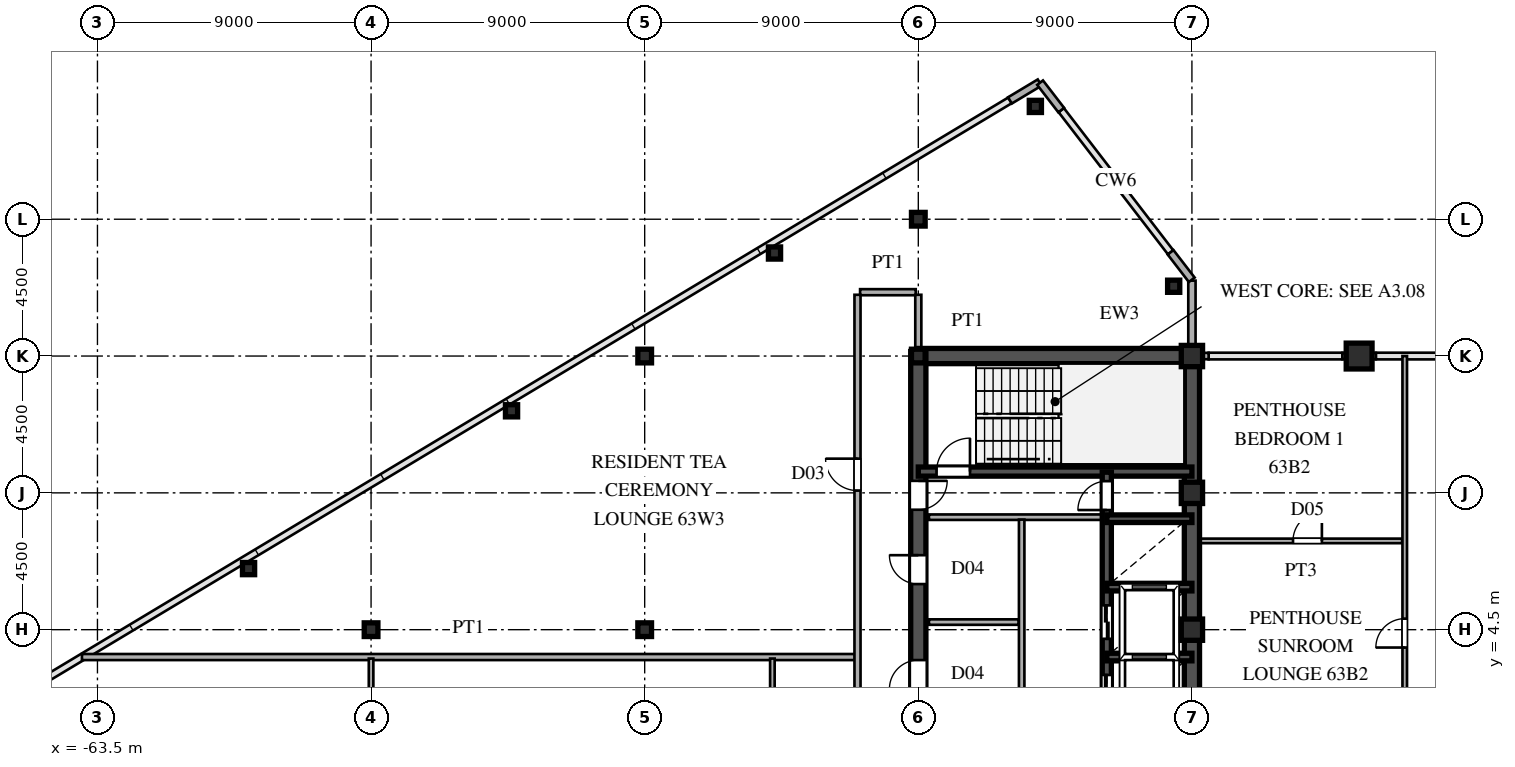
"""IFC4 building model, lengths in metres.
Left out: names, types, materials, properties, quantities, classifications, styles, units other than length and angle.
Written with IfcOpenShell. Run it as: python <this file> out.ifc"""

import sys

from ifc_helpers import new_model, si_unit, direction, frame, frame_2d, origin, origin_2d, place, context, subcontext, project, spatial, rectangle, hollow_rectangle, i_section, extrude, source, transform, mapped, element, fill, save


model = new_model("IFC4")
c1 = context("Model", 3, precision=1e-05, world=origin(), true_north=direction((0.0, 1.0)))
c2 = subcontext(c1, "Body", "Model", "MODEL_VIEW")
j1 = project(units=[si_unit("LENGTHUNIT", "METRE"), si_unit("PLANEANGLEUNIT", "RADIAN")], contexts=[c1])
p1 = place(None, origin())
s1 = spatial("IfcSite", under=j1, at=p1, CompositionType="ELEMENT")
p2 = place(p1, origin())
s2 = spatial("IfcBuilding", under=s1, at=p2, CompositionType="ELEMENT")
p3 = place(p2, frame((0.0, 0.0, 239.4)))
s3 = spatial("IfcBuildingStorey", under=s2, at=p3, CompositionType="ELEMENT", Elevation=239.4)
m1 = source(origin(), c2, "Body", "SweptSolid", [
    extrude(hollow_rectangle(XDim=0.7, YDim=0.7, WallThickness=0.03, at=origin_2d()), origin(), (0.0, 0.0, 1.0), 3.75),
])
for number, where, z_axis, x_axis in (
    (1, (-27.5, 4.5, 0.0), (0.0, 0.0, 1.0), (1.0, 0.0, 0.0)),
    (2, (-27.5, 9.0, 0.0), (0.0, 0.0, 1.0), (1.0, 0.0, 0.0)),
    (3, (-27.5, 13.5, 0.0), (0.0, 0.0, 1.0), (1.0, 0.0, 0.0)),
):
    element("IfcColumn", number, at=place(p3, frame(where, z_axis=z_axis, x_axis=x_axis)), inside=s3, PredefinedType="COLUMN", context=c2, shape_type="MappedRepresentation", body=[
        mapped(m1, transform((0.0, 0.0, 0.0), scale=1.0)),
    ])
m2 = source(origin(), c2, "Body", "SweptSolid", [
    extrude(i_section(OverallWidth=0.45, OverallDepth=0.45, WebThickness=0.016, FlangeThickness=0.025, at=origin_2d()), origin(), (0.0, 0.0, 1.0), 3.75),
])
for number, where, z_axis, x_axis in (
    (4, (-36.5, 13.5, 0.0), (0.0, 0.0, 1.0), (1.0, 0.0, 0.0)),
    (5, (-36.5, 18.0, 0.0), (0.0, 0.0, 1.0), (1.0, 0.0, 0.0)),
    (6, (-45.5, 4.5, 0.0), (0.0, 0.0, 1.0), (1.0, 0.0, 0.0)),
    (7, (-45.5, 13.5, 0.0), (0.0, 0.0, 1.0), (1.0, 0.0, 0.0)),
    (8, (-54.5, 4.5, 0.0), (0.0, 0.0, 1.0), (1.0, 0.0, 0.0)),
):
    element("IfcColumn", number, at=place(p3, frame(where, z_axis=z_axis, x_axis=x_axis)), inside=s3, PredefinedType="COLUMN", context=c2, shape_type="MappedRepresentation", body=[
        mapped(m2, transform((0.0, 0.0, 0.0), scale=1.0)),
    ])
m3 = source(origin(), c2, "Body", "SweptSolid", [
    extrude(hollow_rectangle(XDim=0.4, YDim=0.4, WallThickness=0.016, at=origin_2d()), origin(), (0.0, 0.0, 1.0), 3.75),
])
for number, where, z_axis, x_axis in (
    (9, (-28.1, 15.796, 0.0), (0.0, 0.0, 1.0), (1.0, 0.0, 0.0)),
    (10, (-32.65, 21.71, 0.0), (0.0, 0.0, 1.0), (1.0, 0.0, 0.0)),
    (11, (-41.23, 16.889, 0.0), (0.0, 0.0, 1.0), (1.0, 0.0, 0.0)),
    (12, (-49.88, 11.699, 0.0), (0.0, 0.0, 1.0), (1.0, 0.0, 0.0)),
    (13, (-58.53, 6.509, 0.0), (0.0, 0.0, 1.0), (1.0, 0.0, 0.0)),
):
    element("IfcColumn", number, at=place(p3, frame(where, z_axis=z_axis, x_axis=x_axis)), inside=s3, PredefinedType="COLUMN", context=c2, shape_type="MappedRepresentation", body=[
        mapped(m3, transform((0.0, 0.0, 0.0), scale=1.0)),
    ])
m4 = source(origin(), c2, "Body", "SweptSolid", [
    extrude(hollow_rectangle(XDim=0.85, YDim=0.85, WallThickness=0.036, at=origin_2d()), origin(), (0.0, 0.0, 1.0), 3.75),
])
p4 = place(p3, frame((-22.0, 13.5, 0.0), z_axis=(0.0, 0.0, 1.0), x_axis=(1.0, 0.0, 0.0)))
e14 = element("IfcColumn", 14, at=p4, inside=s3, PredefinedType="COLUMN", context=c2, shape_type="MappedRepresentation", body=[
    mapped(m4, transform((0.0, 0.0, 0.0), scale=1.0)),
])
p5 = place(p3, frame((-27.5, 13.755, 0.0), z_axis=(0.0, 0.0, 1.0), x_axis=(0.0, 1.0, 0.0)))
e15 = element("IfcWall", 15, at=p5, inside=s3, PredefinedType="SOLIDWALL", context=c2, shape_type="SweptSolid", body=[
    extrude(rectangle(XDim=0.62, YDim=0.24, at=frame_2d((0.31, 0.0))), origin(), (0.0, 0.0, 1.0), 3.03),
])
p6 = place(p3, frame((-27.5, 14.375, 0.0), z_axis=(0.0, 0.0, 1.0), x_axis=(0.0, 1.0, 0.0)))
e16 = element("IfcWall", 16, at=p6, inside=s3, PredefinedType="SOLIDWALL", context=c2, shape_type="SweptSolid", body=[
    extrude(rectangle(XDim=1.605, YDim=0.24, at=frame_2d((0.803, 0.0))), origin(), (0.0, 0.0, 1.0), 3.53),
])
for number, where, z_axis, x_axis in (
    (17, (-27.506, 16.008, 0.0), (0.0, 0.0, 1.0), (-0.61, 0.793, 0.0)),
    (18, (-31.799, 21.588, 0.0), (0.0, 0.0, 1.0), (-0.61, 0.793, 0.0)),
    (19, (-32.509, 22.495, 0.0), (0.0, 0.0, 1.0), (-0.857, -0.515, 0.0)),
):
    element("IfcWall", number, at=place(p3, frame(where, z_axis=z_axis, x_axis=x_axis)), inside=s3, PredefinedType="SOLIDWALL", context=c2, shape_type="SweptSolid", body=[
        extrude(rectangle(XDim=1.14, YDim=0.24, at=frame_2d((0.57, 0.0))), origin(), (0.0, 0.0, 1.0), 3.53),
    ])
p7 = place(p3, frame((-27.49, 13.5, 0.0), z_axis=(0.0, 0.0, 1.0), x_axis=(1.0, 0.0, 0.0)))
e20 = element("IfcWall", 20, at=p7, inside=s3, PredefinedType="SOLIDWALL", context=c2, shape_type="SweptSolid", body=[
    extrude(rectangle(XDim=0.54, YDim=0.21, at=frame_2d((0.27, 0.0))), origin(), (0.0, 0.0, 1.0), 3.03),
])
p8 = place(p3, frame((-22.55, 13.5, 0.0), z_axis=(0.0, 0.0, 1.0), x_axis=(1.0, 0.0, 0.0)))
e21 = element("IfcWall", 21, at=p8, inside=s3, PredefinedType="SOLIDWALL", context=c2, shape_type="SweptSolid", body=[
    extrude(rectangle(XDim=1.1, YDim=0.21, at=frame_2d((0.55, 0.0))), origin(), (0.0, 0.0, 1.0), 3.03),
])
p9 = place(p3, frame((-27.5, 1.3, 0.0), z_axis=(0.0, 0.0, 1.0), x_axis=(0.0, 1.0, 0.0)))
e22 = element("IfcWall", 22, at=p9, inside=s3, PredefinedType="SHEAR", context=c2, shape_type="SweptSolid", body=[
    extrude(rectangle(XDim=12.2, YDim=0.5, at=frame_2d((6.1, 0.0))), origin(), (0.0, 0.0, 1.0), 3.53),
])
p10 = place(p3, frame((-36.5, 13.5, 0.0), z_axis=(0.0, 0.0, 1.0), x_axis=(1.0, 0.0, 0.0)))
e23 = element("IfcWall", 23, at=p10, inside=s3, PredefinedType="SHEAR", context=c2, shape_type="SweptSolid", body=[
    extrude(rectangle(XDim=9.0, YDim=0.5, at=frame_2d((4.5, 0.0))), origin(), (0.0, 0.0, 1.0), 3.53),
])
p11 = place(p3, frame((-36.5, 8.2, 0.0), z_axis=(0.0, 0.0, 1.0), x_axis=(0.0, 1.0, 0.0)))
e24 = element("IfcWall", 24, at=p11, inside=s3, PredefinedType="SHEAR", context=c2, shape_type="SweptSolid", body=[
    extrude(rectangle(XDim=5.45, YDim=0.5, at=frame_2d((2.725, 0.0))), origin(), (0.0, 0.0, 1.0), 3.53),
])
p12 = place(p11, frame((0.245, 0.0, 0.0)))
e25 = element("IfcOpeningElement", 25, at=p12, cuts=e24, PredefinedType="OPENING", context=c2, shape_type="SweptSolid", body=[
    extrude(rectangle(XDim=0.95, YDim=2.15, at=frame_2d((0.475, 1.075))), frame((0.0, 0.26, 0.0), z_axis=(0.0, -1.0, 0.0), x_axis=(1.0, 0.0, 0.0)), (0.0, 0.0, 1.0), 0.52),
])
p13 = place(p3, frame((-36.5, 1.3, 0.0), z_axis=(0.0, 0.0, 1.0), x_axis=(0.0, 1.0, 0.0)))
e26 = element("IfcWall", 26, at=p13, inside=s3, PredefinedType="SHEAR", context=c2, shape_type="SweptSolid", body=[
    extrude(rectangle(XDim=3.45, YDim=0.5, at=frame_2d((1.725, 0.0))), origin(), (0.0, 0.0, 1.0), 3.53),
])
p14 = place(p13, frame((1.25, 0.0, 0.0)))
e27 = element("IfcOpeningElement", 27, at=p14, cuts=e26, PredefinedType="OPENING", context=c2, shape_type="SweptSolid", body=[
    extrude(rectangle(XDim=0.95, YDim=2.15, at=frame_2d((0.475, 1.075))), frame((0.0, 0.26, 0.0), z_axis=(0.0, -1.0, 0.0), x_axis=(1.0, 0.0, 0.0)), (0.0, 0.0, 1.0), 0.52),
])
p15 = place(p3, frame((-36.5, 4.75, 0.0), z_axis=(0.0, 0.0, 1.0), x_axis=(0.0, 1.0, 0.0)))
e28 = element("IfcWall", 28, at=p15, inside=s3, PredefinedType="SHEAR", context=c2, shape_type="SweptSolid", body=[
    extrude(rectangle(XDim=3.45, YDim=0.5, at=frame_2d((1.725, 0.0))), origin(), (0.0, 0.0, 1.0), 3.53),
])
p16 = place(p15, frame((1.25, 0.0, 0.0)))
e29 = element("IfcOpeningElement", 29, at=p16, cuts=e28, PredefinedType="OPENING", context=c2, shape_type="SweptSolid", body=[
    extrude(rectangle(XDim=0.95, YDim=2.15, at=frame_2d((0.475, 1.075))), frame((0.0, 0.26, 0.0), z_axis=(0.0, -1.0, 0.0), x_axis=(1.0, 0.0, 0.0)), (0.0, 0.0, 1.0), 0.52),
])
p17 = place(p3, frame((-36.5, 9.7, 0.0), z_axis=(0.0, 0.0, 1.0), x_axis=(1.0, 0.0, 0.0)))
e30 = element("IfcWall", 30, at=p17, inside=s3, PredefinedType="SHEAR", context=c2, shape_type="SweptSolid", body=[
    extrude(rectangle(XDim=9.0, YDim=0.3, at=frame_2d((4.5, 0.0))), origin(), (0.0, 0.0, 1.0), 3.53),
])
p18 = place(p17, frame((0.6, 0.0, 0.0)))
e31 = element("IfcOpeningElement", 31, at=p18, cuts=e30, PredefinedType="OPENING", context=c2, shape_type="SweptSolid", body=[
    extrude(rectangle(XDim=1.1, YDim=2.2, at=frame_2d((0.55, 1.1))), frame((0.0, 0.16, 0.0), z_axis=(0.0, -1.0, 0.0), x_axis=(1.0, 0.0, 0.0)), (0.0, 0.0, 1.0), 0.32),
])
for number, where, z_axis, x_axis in (
    (32, (-30.3, 3.6, 0.0), (0.0, 0.0, 1.0), (1.0, 0.0, 0.0)),
    (33, (-30.3, 5.9, 0.0), (0.0, 0.0, 1.0), (1.0, 0.0, 0.0)),
    (34, (-30.3, 8.15, 0.0), (0.0, 0.0, 1.0), (1.0, 0.0, 0.0)),
):
    element("IfcWall", number, at=place(p3, frame(where, z_axis=z_axis, x_axis=x_axis)), inside=s3, PredefinedType="SHEAR", context=c2, shape_type="SweptSolid", body=[
        extrude(rectangle(XDim=2.8, YDim=0.25, at=frame_2d((1.4, 0.0))), origin(), (0.0, 0.0, 1.0), 3.53),
    ])
p19 = place(p3, frame((-30.3, 1.32, 0.0), z_axis=(0.0, 0.0, 1.0), x_axis=(0.0, 1.0, 0.0)))
e35 = element("IfcWall", 35, at=p19, inside=s3, PredefinedType="SHEAR", context=c2, shape_type="SweptSolid", body=[
    extrude(rectangle(XDim=2.28, YDim=0.3, at=frame_2d((1.14, 0.0))), origin(), (0.0, 0.0, 1.0), 3.53),
])
p20 = place(p19, frame((0.59, 0.0, 0.0)))
e36 = element("IfcOpeningElement", 36, at=p20, cuts=e35, PredefinedType="OPENING", context=c2, shape_type="SweptSolid", body=[
    extrude(rectangle(XDim=1.1, YDim=2.2, at=frame_2d((0.55, 1.1))), frame((0.0, 0.16, 0.0), z_axis=(0.0, -1.0, 0.0), x_axis=(1.0, 0.0, 0.0)), (0.0, 0.0, 1.0), 0.32),
])
p21 = place(p3, frame((-30.3, 3.6, 0.0), z_axis=(0.0, 0.0, 1.0), x_axis=(0.0, 1.0, 0.0)))
e37 = element("IfcWall", 37, at=p21, inside=s3, PredefinedType="SHEAR", context=c2, shape_type="SweptSolid", body=[
    extrude(rectangle(XDim=2.3, YDim=0.3, at=frame_2d((1.15, 0.0))), origin(), (0.0, 0.0, 1.0), 3.53),
])
p22 = place(p21, frame((0.6, 0.0, 0.0)))
e38 = element("IfcOpeningElement", 38, at=p22, cuts=e37, PredefinedType="OPENING", context=c2, shape_type="SweptSolid", body=[
    extrude(rectangle(XDim=1.1, YDim=2.2, at=frame_2d((0.55, 1.1))), frame((0.0, 0.16, 0.0), z_axis=(0.0, -1.0, 0.0), x_axis=(1.0, 0.0, 0.0)), (0.0, 0.0, 1.0), 0.32),
])
p23 = place(p3, frame((-30.3, 5.9, 0.0), z_axis=(0.0, 0.0, 1.0), x_axis=(0.0, 1.0, 0.0)))
e39 = element("IfcWall", 39, at=p23, inside=s3, PredefinedType="SHEAR", context=c2, shape_type="SweptSolid", body=[
    extrude(rectangle(XDim=2.25, YDim=0.3, at=frame_2d((1.125, 0.0))), origin(), (0.0, 0.0, 1.0), 3.53),
])
p24 = place(p3, frame((-30.3, 8.15, 0.0), z_axis=(0.0, 0.0, 1.0), x_axis=(0.0, 1.0, 0.0)))
e40 = element("IfcWall", 40, at=p24, inside=s3, PredefinedType="SHEAR", context=c2, shape_type="SweptSolid", body=[
    extrude(rectangle(XDim=1.53, YDim=0.3, at=frame_2d((0.765, 0.0))), origin(), (0.0, 0.0, 1.0), 3.53),
])
p25 = place(p24, frame((0.285, 0.0, 0.0)))
e41 = element("IfcOpeningElement", 41, at=p25, cuts=e40, PredefinedType="OPENING", context=c2, shape_type="SweptSolid", body=[
    extrude(rectangle(XDim=0.95, YDim=2.15, at=frame_2d((0.475, 1.075))), frame((0.0, 0.16, 0.0), z_axis=(0.0, -1.0, 0.0), x_axis=(1.0, 0.0, 0.0)), (0.0, 0.0, 1.0), 0.32),
])
p26 = place(p3, frame((-36.15, 8.2, 0.0), z_axis=(0.0, 0.0, 1.0), x_axis=(1.0, 0.0, 0.0)))
e42 = element("IfcWall", 42, at=p26, inside=s3, PredefinedType="PARTITIONING", context=c2, shape_type="SweptSolid", body=[
    extrude(rectangle(XDim=5.7, YDim=0.18, at=frame_2d((2.85, 0.0))), origin(), (0.0, 0.0, 1.0), 3.53),
])
p27 = place(p3, frame((-33.1, 1.38, 0.0), z_axis=(0.0, 0.0, 1.0), x_axis=(0.0, 1.0, 0.0)))
e43 = element("IfcWall", 43, at=p27, inside=s3, PredefinedType="PARTITIONING", context=c2, shape_type="SweptSolid", body=[
    extrude(rectangle(XDim=6.74, YDim=0.18, at=frame_2d((3.37, 0.0))), origin(), (0.0, 0.0, 1.0), 3.53),
])
p28 = place(p3, frame((-36.15, 4.75, 0.0), z_axis=(0.0, 0.0, 1.0), x_axis=(1.0, 0.0, 0.0)))
e44 = element("IfcWall", 44, at=p28, inside=s3, PredefinedType="PARTITIONING", context=c2, shape_type="SweptSolid", body=[
    extrude(rectangle(XDim=2.95, YDim=0.18, at=frame_2d((1.475, 0.0))), origin(), (0.0, 0.0, 1.0), 3.53),
])
p29 = place(p3, frame((-64.01, 3.6, 0.0), z_axis=(0.0, 0.0, 1.0), x_axis=(1.0, 0.0, 0.0)))
e45 = element("IfcWall", 45, at=p29, inside=s3, PredefinedType="PARTITIONING", context=c2, shape_type="SweptSolid", body=[
    extrude(rectangle(XDim=25.43, YDim=0.2, at=frame_2d((12.715, 0.0))), origin(), (0.0, 0.0, 1.0), 3.53),
])
p30 = place(p3, frame((-27.245, 7.42, 0.0), z_axis=(0.0, 0.0, 1.0), x_axis=(1.0, 0.0, 0.0)))
e46 = element("IfcWall", 46, at=p30, inside=s3, PredefinedType="PARTITIONING", context=c2, shape_type="SweptSolid", body=[
    extrude(rectangle(XDim=6.66, YDim=0.15, at=frame_2d((3.33, 0.0))), origin(), (0.0, 0.0, 1.0), 3.53),
])
p31 = place(p30, frame((3.07, 0.0, 0.0)))
e47 = element("IfcOpeningElement", 47, at=p31, cuts=e46, PredefinedType="OPENING", context=c2, shape_type="SweptSolid", body=[
    extrude(rectangle(XDim=0.95, YDim=2.15, at=frame_2d((0.475, 1.075))), frame((0.0, 0.085, 0.0), z_axis=(0.0, -1.0, 0.0), x_axis=(1.0, 0.0, 0.0)), (0.0, 0.0, 1.0), 0.17),
])
p32 = place(p3, frame((-38.415, 15.6, 0.0), z_axis=(0.0, 0.0, 1.0), x_axis=(1.0, 0.0, 0.0)))
e48 = element("IfcWall", 48, at=p32, inside=s3, PredefinedType="PARTITIONING", context=c2, shape_type="SweptSolid", body=[
    extrude(rectangle(XDim=1.83, YDim=0.2, at=frame_2d((0.915, 0.0))), origin(), (0.0, 0.0, 1.0), 3.53),
])
p33 = place(p3, frame((-54.5, -8.75, 0.0), z_axis=(0.0, 0.0, 1.0), x_axis=(0.0, 1.0, 0.0)))
e49 = element("IfcWall", 49, at=p33, inside=s3, PredefinedType="PARTITIONING", context=c2, shape_type="SweptSolid", body=[
    extrude(rectangle(XDim=12.3, YDim=0.15, at=frame_2d((6.15, 0.0))), origin(), (0.0, 0.0, 1.0), 2.93),
])
p34 = place(p33, frame((5.675, 0.0, 0.0)))
e50 = element("IfcOpeningElement", 50, at=p34, cuts=e49, PredefinedType="OPENING", context=c2, shape_type="SweptSolid", body=[
    extrude(rectangle(XDim=0.95, YDim=2.15, at=frame_2d((0.475, 1.075))), frame((0.0, 0.085, 0.0), z_axis=(0.0, -1.0, 0.0), x_axis=(1.0, 0.0, 0.0)), (0.0, 0.0, 1.0), 0.17),
])
p35 = place(p3, frame((-41.3, -0.068, 0.0), z_axis=(0.0, 0.0, 1.0), x_axis=(0.0, 1.0, 0.0)))
e51 = element("IfcWall", 51, at=p35, inside=s3, PredefinedType="PARTITIONING", context=c2, shape_type="SweptSolid", body=[
    extrude(rectangle(XDim=3.618, YDim=0.15, at=frame_2d((1.809, 0.0))), origin(), (0.0, 0.0, 1.0), 3.53),
])
p36 = place(p3, frame((-38.5, -15.515, 0.0), z_axis=(0.0, 0.0, 1.0), x_axis=(0.0, 1.0, 0.0)))
e52 = element("IfcWall", 52, at=p36, inside=s3, PredefinedType="PARTITIONING", context=c2, shape_type="SweptSolid", body=[
    extrude(rectangle(XDim=31.03, YDim=0.2, at=frame_2d((15.515, 0.0))), origin(), (0.0, 0.0, 1.0), 3.53),
])
p37 = place(p36, frame((2.79, 0.0, 0.0)))
e53 = element("IfcOpeningElement", 53, at=p37, cuts=e52, PredefinedType="OPENING", context=c2, shape_type="SweptSolid", body=[
    extrude(rectangle(XDim=1.05, YDim=2.25, at=frame_2d((0.525, 1.125))), frame((0.0, 0.11, 0.0), z_axis=(0.0, -1.0, 0.0), x_axis=(1.0, 0.0, 0.0)), (0.0, 0.0, 1.0), 0.22),
])
p38 = place(p36, frame((12.204, 0.0, 0.0)))
e54 = element("IfcOpeningElement", 54, at=p38, cuts=e52, PredefinedType="OPENING", context=c2, shape_type="SweptSolid", body=[
    extrude(rectangle(XDim=1.05, YDim=2.25, at=frame_2d((0.525, 1.125))), frame((0.0, 0.11, 0.0), z_axis=(0.0, -1.0, 0.0), x_axis=(1.0, 0.0, 0.0)), (0.0, 0.0, 1.0), 0.22),
])
p39 = place(p36, frame((24.59, 0.0, 0.0)))
e55 = element("IfcOpeningElement", 55, at=p39, cuts=e52, PredefinedType="OPENING", context=c2, shape_type="SweptSolid", body=[
    extrude(rectangle(XDim=1.05, YDim=2.25, at=frame_2d((0.525, 1.125))), frame((0.0, 0.11, 0.0), z_axis=(0.0, -1.0, 0.0), x_axis=(1.0, 0.0, 0.0)), (0.0, 0.0, 1.0), 0.22),
])
p40 = place(p3, frame((-36.5, 13.755, 0.0), z_axis=(0.0, 0.0, 1.0), x_axis=(0.0, 1.0, 0.0)))
e56 = element("IfcWall", 56, at=p40, inside=s3, PredefinedType="PARTITIONING", context=c2, shape_type="SweptSolid", body=[
    extrude(rectangle(XDim=1.76, YDim=0.2, at=frame_2d((0.88, 0.0))), origin(), (0.0, 0.0, 1.0), 2.93),
])
p41 = place(p3, frame((-20.5, 1.435, 0.0), z_axis=(0.0, 0.0, 1.0), x_axis=(0.0, 1.0, 0.0)))
e57 = element("IfcWall", 57, at=p41, inside=s3, PredefinedType="PARTITIONING", context=c2, shape_type="SweptSolid", body=[
    extrude(rectangle(XDim=12.065, YDim=0.15, at=frame_2d((6.032, 0.0))), origin(), (0.0, 0.0, 1.0), 3.53),
])
p42 = place(p41, frame((2.478, 0.0, 0.0)))
e58 = element("IfcOpeningElement", 58, at=p42, cuts=e57, PredefinedType="OPENING", context=c2, shape_type="SweptSolid", body=[
    extrude(rectangle(XDim=0.95, YDim=2.15, at=frame_2d((0.475, 1.075))), frame((0.0, 0.085, 0.0), z_axis=(0.0, -1.0, 0.0), x_axis=(1.0, 0.0, 0.0)), (0.0, 0.0, 1.0), 0.17),
])
m5 = source(origin(), c2, "Body", "SweptSolid", [
    extrude(rectangle(XDim=0.95, YDim=2.15, at=frame_2d((0.475, 1.075))), frame((0.0, 0.025, 0.0), z_axis=(0.0, -1.0, 0.0), x_axis=(1.0, 0.0, 0.0)), (0.0, 0.0, 1.0), 0.05),
])
p43 = place(p12, frame((0.95, 0.0, 0.0), z_axis=(0.0, 0.0, 1.0), x_axis=(-1.0, 0.0, 0.0)))
e59 = element("IfcDoor", 59, at=p43, inside=s3, OperationType="SINGLE_SWING_RIGHT", PredefinedType="DOOR", context=c2, shape_type="MappedRepresentation", body=[
    mapped(m5, transform((0.0, 0.0, 0.0), scale=1.0)),
])
fill(e25, e59)
p44 = place(p14, origin())
e60 = element("IfcDoor", 60, at=p44, inside=s3, OperationType="SINGLE_SWING_LEFT", PredefinedType="DOOR", context=c2, shape_type="MappedRepresentation", body=[
    mapped(m5, transform((0.0, 0.0, 0.0), scale=1.0)),
])
fill(e27, e60)
p45 = place(p16, origin())
e61 = element("IfcDoor", 61, at=p45, inside=s3, OperationType="SINGLE_SWING_RIGHT", PredefinedType="DOOR", context=c2, shape_type="MappedRepresentation", body=[
    mapped(m5, transform((0.0, 0.0, 0.0), scale=1.0)),
])
fill(e29, e61)
m6 = source(origin(), c2, "Body", "SweptSolid", [
    extrude(rectangle(XDim=1.1, YDim=2.2, at=frame_2d((0.55, 1.1))), frame((0.0, 0.025, 0.0), z_axis=(0.0, -1.0, 0.0), x_axis=(1.0, 0.0, 0.0)), (0.0, 0.0, 1.0), 0.05),
])
p46 = place(p18, origin())
e62 = element("IfcDoor", 62, at=p46, inside=s3, OperationType="SINGLE_SWING_RIGHT", PredefinedType="DOOR", context=c2, shape_type="MappedRepresentation", body=[
    mapped(m6, transform((0.0, 0.0, 0.0), scale=1.0)),
])
fill(e31, e62)
m7 = source(origin(), c2, "Body", "SweptSolid", [
    extrude(rectangle(XDim=1.1, YDim=2.2, at=frame_2d((0.55, 1.1))), frame((0.0, 0.025, 0.0), z_axis=(0.0, -1.0, 0.0), x_axis=(1.0, 0.0, 0.0)), (0.0, 0.0, 1.0), 0.05),
])
p47 = place(p20, origin())
e63 = element("IfcDoor", 63, at=p47, inside=s3, OperationType="DOUBLE_DOOR_SLIDING", PredefinedType="DOOR", context=c2, shape_type="MappedRepresentation", body=[
    mapped(m7, transform((0.0, 0.0, 0.0), scale=1.0)),
])
fill(e36, e63)
p48 = place(p22, origin())
e64 = element("IfcDoor", 64, at=p48, inside=s3, OperationType="DOUBLE_DOOR_SLIDING", PredefinedType="DOOR", context=c2, shape_type="MappedRepresentation", body=[
    mapped(m7, transform((0.0, 0.0, 0.0), scale=1.0)),
])
fill(e38, e64)
p49 = place(p25, origin())
e65 = element("IfcDoor", 65, at=p49, inside=s3, OperationType="SINGLE_SWING_LEFT", PredefinedType="DOOR", context=c2, shape_type="MappedRepresentation", body=[
    mapped(m5, transform((0.0, 0.0, 0.0), scale=1.0)),
])
fill(e41, e65)
m8 = source(origin(), c2, "Body", "SweptSolid", [
    extrude(rectangle(XDim=0.95, YDim=2.15, at=frame_2d((0.475, 1.075))), frame((0.0, 0.025, 0.0), z_axis=(0.0, -1.0, 0.0), x_axis=(1.0, 0.0, 0.0)), (0.0, 0.0, 1.0), 0.05),
])
p50 = place(p31, origin())
e66 = element("IfcDoor", 66, at=p50, inside=s3, OperationType="SINGLE_SWING_RIGHT", PredefinedType="DOOR", context=c2, shape_type="MappedRepresentation", body=[
    mapped(m8, transform((0.0, 0.0, 0.0), scale=1.0)),
])
fill(e47, e66)
m9 = source(origin(), c2, "Body", "SweptSolid", [
    extrude(rectangle(XDim=1.05, YDim=2.25, at=frame_2d((0.525, 1.125))), frame((0.0, 0.025, 0.0), z_axis=(0.0, -1.0, 0.0), x_axis=(1.0, 0.0, 0.0)), (0.0, 0.0, 1.0), 0.05),
])
p51 = place(p39, origin())
e67 = element("IfcDoor", 67, at=p51, inside=s3, OperationType="SINGLE_SWING_RIGHT", PredefinedType="DOOR", context=c2, shape_type="MappedRepresentation", body=[
    mapped(m9, transform((0.0, 0.0, 0.0), scale=1.0)),
])
fill(e55, e67)
p52 = place(p42, origin())
e68 = element("IfcDoor", 68, at=p52, inside=s3, OperationType="SINGLE_SWING_LEFT", PredefinedType="DOOR", context=c2, shape_type="MappedRepresentation", body=[
    mapped(m8, transform((0.0, 0.0, 0.0), scale=1.0)),
])
fill(e58, e68)
save(model, sys.argv[1])
